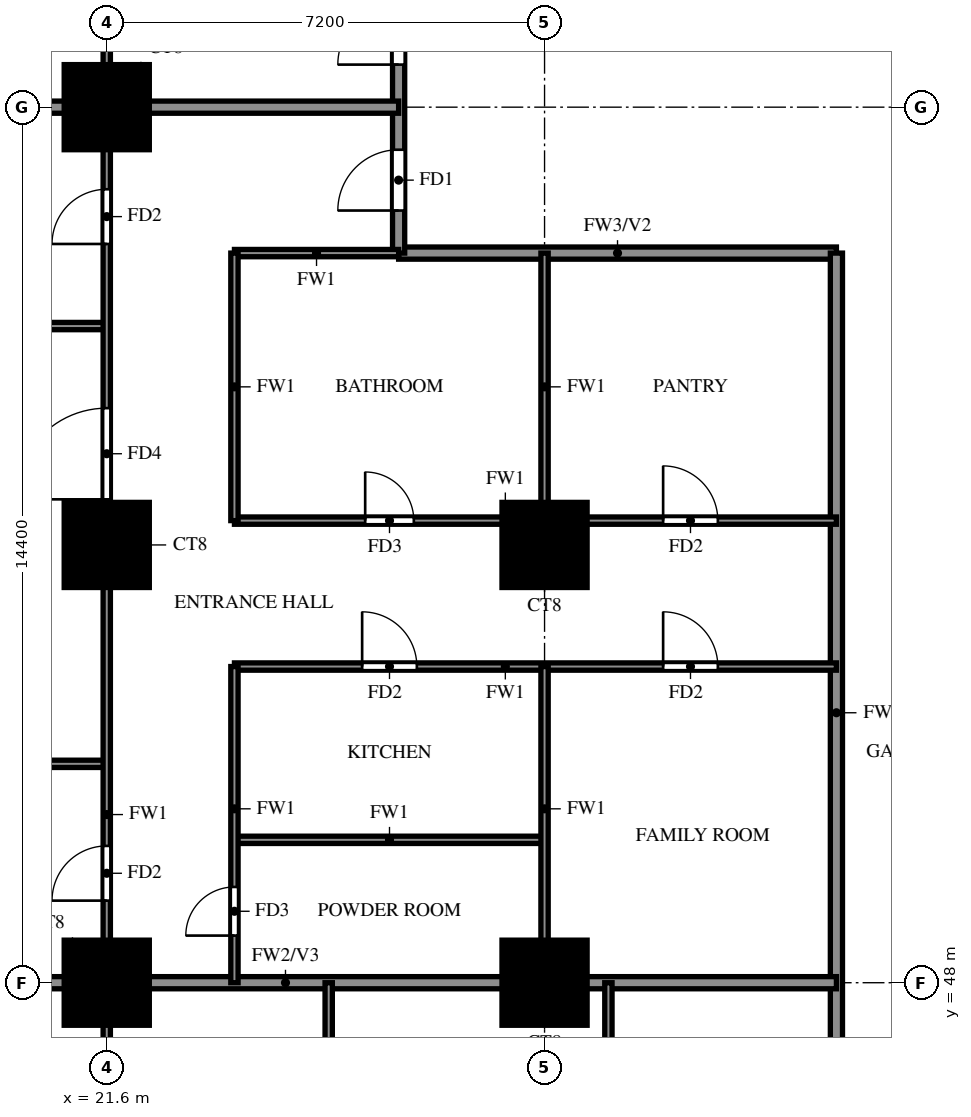
"""IFC4 building model, lengths in metres.
Left out: names, types, materials, properties, quantities, classifications, styles, units other than length and angle.
Written with IfcOpenShell. Run it as: python <this file> out.ifc"""

import sys

from ifc_helpers import new_model, si_unit, direction, frame, frame_2d, origin, origin_2d, place, context, subcontext, project, spatial, rectangle, extrude, source, transform, mapped, element, fill, save


model = new_model("IFC4")
c1 = context("Model", 3, precision=1e-05, world=origin(), true_north=direction((0.0, 1.0)))
c2 = subcontext(c1, "Body", "Model", "MODEL_VIEW")
j1 = project(units=[si_unit("LENGTHUNIT", "METRE"), si_unit("PLANEANGLEUNIT", "RADIAN")], contexts=[c1])
p1 = place(None, origin())
s1 = spatial("IfcSite", under=j1, at=p1, CompositionType="ELEMENT")
p2 = place(p1, origin())
s2 = spatial("IfcBuilding", under=s1, at=p2, CompositionType="ELEMENT")
p3 = place(p2, frame((0.0, 0.0, 30.5)))
s3 = spatial("IfcBuildingStorey", under=s2, at=p3, CompositionType="ELEMENT", Elevation=30.5)
m1 = source(origin(), c2, "Body", "SweptSolid", [
    extrude(rectangle(XDim=1.4, YDim=1.4, at=origin_2d()), origin(), (0.0, 0.0, 1.0), 3.18),
])
for number, where, z_axis, x_axis in (
    (1, (21.6, 48.0, 0.0), (0.0, 0.0, 1.0), (1.0, 0.0, 0.0)),
    (2, (28.8, 48.0, 0.0), (0.0, 0.0, 1.0), (1.0, 0.0, 0.0)),
    (3, (21.6, 55.2, 0.0), (0.0, 0.0, 1.0), (1.0, 0.0, 0.0)),
    (4, (28.8, 55.2, 0.0), (0.0, 0.0, 1.0), (1.0, 0.0, 0.0)),
    (5, (21.6, 62.4, 0.0), (0.0, 0.0, 1.0), (1.0, 0.0, 0.0)),
):
    element("IfcColumn", number, at=place(p3, frame(where, z_axis=z_axis, x_axis=x_axis)), inside=s3, PredefinedType="COLUMN", context=c2, shape_type="MappedRepresentation", body=[
        mapped(m1, transform((0.0, 0.0, 0.0))),
    ])
p4 = place(p3, frame((26.4, 60.0, 0.0), z_axis=(0.0, 0.0, 1.0), x_axis=(1.0, 0.0, 0.0)))
e6 = element("IfcWall", 6, at=p4, inside=s3, PredefinedType="SOLIDWALL", context=c2, shape_type="SweptSolid", body=[
    extrude(rectangle(XDim=7.2, YDim=0.2, at=frame_2d((3.6, 0.0))), origin(), (0.0, 0.0, 1.0), 3.18),
])
p5 = place(p3, frame((26.4, 60.0, 0.0), z_axis=(0.0, 0.0, 1.0), x_axis=(0.0, 1.0, 0.0)))
e7 = element("IfcWall", 7, at=p5, inside=s3, PredefinedType="SOLIDWALL", context=c2, shape_type="SweptSolid", body=[
    extrude(rectangle(XDim=9.6, YDim=0.2, at=frame_2d((4.8, 0.0))), origin(), (0.0, 0.0, 1.0), 3.18),
])
p6 = place(p5, frame((0.7, 0.0, 0.0)))
e8 = element("IfcOpeningElement", 8, at=p6, cuts=e7, PredefinedType="OPENING", context=c2, shape_type="SweptSolid", body=[
    extrude(rectangle(XDim=1.0, YDim=2.1, at=frame_2d((0.5, 1.05))), frame((0.0, 0.11, 0.0), z_axis=(0.0, -1.0, 0.0), x_axis=(1.0, 0.0, 0.0)), (0.0, 0.0, 1.0), 0.22),
])
p7 = place(p5, frame((3.1, 0.0, 0.0)))
e9 = element("IfcOpeningElement", 9, at=p7, cuts=e7, PredefinedType="OPENING", context=c2, shape_type="SweptSolid", body=[
    extrude(rectangle(XDim=1.0, YDim=2.1, at=frame_2d((0.5, 1.05))), frame((0.0, 0.11, 0.0), z_axis=(0.0, -1.0, 0.0), x_axis=(1.0, 0.0, 0.0)), (0.0, 0.0, 1.0), 0.22),
])
p8 = place(p3, frame((33.6, 45.6, 0.0), z_axis=(0.0, 0.0, 1.0), x_axis=(0.0, 1.0, 0.0)))
e10 = element("IfcWall", 10, at=p8, inside=s3, PredefinedType="SOLIDWALL", context=c2, shape_type="SweptSolid", body=[
    extrude(rectangle(XDim=14.4, YDim=0.2, at=frame_2d((7.2, 0.0))), origin(), (0.0, 0.0, 1.0), 3.18),
])
p9 = place(p3, frame((14.525, 48.0, 0.0), z_axis=(0.0, 0.0, 1.0), x_axis=(1.0, 0.0, 0.0)))
e11 = element("IfcWall", 11, at=p9, inside=s3, PredefinedType="SOLIDWALL", context=c2, shape_type="SweptSolid", body=[
    extrude(rectangle(XDim=19.075, YDim=0.2, at=frame_2d((9.538, 0.0))), origin(), (0.0, 0.0, 1.0), 3.18),
])
p10 = place(p3, frame((14.525, 62.4, 0.0), z_axis=(0.0, 0.0, 1.0), x_axis=(1.0, 0.0, 0.0)))
e12 = element("IfcWall", 12, at=p10, inside=s3, PredefinedType="SOLIDWALL", context=c2, shape_type="SweptSolid", body=[
    extrude(rectangle(XDim=11.875, YDim=0.2, at=frame_2d((5.938, 0.0))), origin(), (0.0, 0.0, 1.0), 3.18),
])
p11 = place(p3, frame((23.7, 50.35, 0.0), z_axis=(0.0, 0.0, 1.0), x_axis=(1.0, 0.0, 0.0)))
e13 = element("IfcWall", 13, at=p11, inside=s3, PredefinedType="PARTITIONING", context=c2, shape_type="SweptSolid", body=[
    extrude(rectangle(XDim=5.1, YDim=0.12, at=frame_2d((2.55, 0.0))), origin(), (0.0, 0.0, 1.0), 3.18),
])
p12 = place(p3, frame((14.525, 51.6, 0.0), z_axis=(0.0, 0.0, 1.0), x_axis=(1.0, 0.0, 0.0)))
e14 = element("IfcWall", 14, at=p12, inside=s3, PredefinedType="PARTITIONING", context=c2, shape_type="SweptSolid", body=[
    extrude(rectangle(XDim=7.075, YDim=0.12, at=frame_2d((3.538, 0.0))), origin(), (0.0, 0.0, 1.0), 2.28),
])
p13 = place(p3, frame((23.7, 53.2, 0.0), z_axis=(0.0, 0.0, 1.0), x_axis=(1.0, 0.0, 0.0)))
e15 = element("IfcWall", 15, at=p13, inside=s3, PredefinedType="PARTITIONING", context=c2, shape_type="SweptSolid", body=[
    extrude(rectangle(XDim=9.9, YDim=0.12, at=frame_2d((4.95, 0.0))), origin(), (0.0, 0.0, 1.0), 3.18),
])
p14 = place(p13, frame((2.1, 0.0, 0.0)))
e16 = element("IfcOpeningElement", 16, at=p14, cuts=e15, PredefinedType="OPENING", context=c2, shape_type="SweptSolid", body=[
    extrude(rectangle(XDim=0.9, YDim=2.1, at=frame_2d((0.45, 1.05))), frame((0.0, 0.07, 0.0), z_axis=(0.0, -1.0, 0.0), x_axis=(1.0, 0.0, 0.0)), (0.0, 0.0, 1.0), 0.14),
])
p15 = place(p13, frame((7.05, 0.0, 0.0)))
e17 = element("IfcOpeningElement", 17, at=p15, cuts=e15, PredefinedType="OPENING", context=c2, shape_type="SweptSolid", body=[
    extrude(rectangle(XDim=0.9, YDim=2.1, at=frame_2d((0.45, 1.05))), frame((0.0, 0.07, 0.0), z_axis=(0.0, -1.0, 0.0), x_axis=(1.0, 0.0, 0.0)), (0.0, 0.0, 1.0), 0.14),
])
p16 = place(p3, frame((23.7, 55.6, 0.0), z_axis=(0.0, 0.0, 1.0), x_axis=(1.0, 0.0, 0.0)))
e18 = element("IfcWall", 18, at=p16, inside=s3, PredefinedType="PARTITIONING", context=c2, shape_type="SweptSolid", body=[
    extrude(rectangle(XDim=9.9, YDim=0.12, at=frame_2d((4.95, 0.0))), origin(), (0.0, 0.0, 1.0), 3.18),
])
p17 = place(p16, frame((2.15, 0.0, 0.0)))
e19 = element("IfcOpeningElement", 19, at=p17, cuts=e18, PredefinedType="OPENING", context=c2, shape_type="SweptSolid", body=[
    extrude(rectangle(XDim=0.8, YDim=2.1, at=frame_2d((0.4, 1.05))), frame((0.0, 0.07, 0.0), z_axis=(0.0, -1.0, 0.0), x_axis=(1.0, 0.0, 0.0)), (0.0, 0.0, 1.0), 0.14),
])
p18 = place(p16, frame((7.05, 0.0, 0.0)))
e20 = element("IfcOpeningElement", 20, at=p18, cuts=e18, PredefinedType="OPENING", context=c2, shape_type="SweptSolid", body=[
    extrude(rectangle(XDim=0.9, YDim=2.1, at=frame_2d((0.45, 1.05))), frame((0.0, 0.07, 0.0), z_axis=(0.0, -1.0, 0.0), x_axis=(1.0, 0.0, 0.0)), (0.0, 0.0, 1.0), 0.14),
])
p19 = place(p3, frame((14.525, 58.8, 0.0), z_axis=(0.0, 0.0, 1.0), x_axis=(1.0, 0.0, 0.0)))
e21 = element("IfcWall", 21, at=p19, inside=s3, PredefinedType="PARTITIONING", context=c2, shape_type="SweptSolid", body=[
    extrude(rectangle(XDim=7.075, YDim=0.12, at=frame_2d((3.538, 0.0))), origin(), (0.0, 0.0, 1.0), 2.28),
])
p20 = place(p3, frame((23.7, 60.0, 0.0), z_axis=(0.0, 0.0, 1.0), x_axis=(1.0, 0.0, 0.0)))
e22 = element("IfcWall", 22, at=p20, inside=s3, PredefinedType="PARTITIONING", context=c2, shape_type="SweptSolid", body=[
    extrude(rectangle(XDim=2.7, YDim=0.12, at=frame_2d((1.35, 0.0))), origin(), (0.0, 0.0, 1.0), 3.18),
])
p21 = place(p3, frame((21.6, 33.725, 0.0), z_axis=(0.0, 0.0, 1.0), x_axis=(0.0, 1.0, 0.0)))
e23 = element("IfcWall", 23, at=p21, inside=s3, PredefinedType="PARTITIONING", context=c2, shape_type="SweptSolid", body=[
    extrude(rectangle(XDim=35.875, YDim=0.12, at=frame_2d((17.938, 0.0))), origin(), (0.0, 0.0, 1.0), 3.18),
])
p22 = place(p21, frame((7.775, 0.0, 0.0)))
e24 = element("IfcOpeningElement", 24, at=p22, cuts=e23, PredefinedType="OPENING", context=c2, shape_type="SweptSolid", body=[
    extrude(rectangle(XDim=0.9, YDim=2.1, at=frame_2d((0.45, 1.05))), frame((0.0, 0.07, 0.0), z_axis=(0.0, -1.0, 0.0), x_axis=(1.0, 0.0, 0.0)), (0.0, 0.0, 1.0), 0.14),
])
p23 = place(p21, frame((15.625, 0.0, 0.0)))
e25 = element("IfcOpeningElement", 25, at=p23, cuts=e23, PredefinedType="OPENING", context=c2, shape_type="SweptSolid", body=[
    extrude(rectangle(XDim=0.9, YDim=2.1, at=frame_2d((0.45, 1.05))), frame((0.0, 0.07, 0.0), z_axis=(0.0, -1.0, 0.0), x_axis=(1.0, 0.0, 0.0)), (0.0, 0.0, 1.0), 0.14),
])
p24 = place(p21, frame((22.225, 0.0, 0.0)))
e26 = element("IfcOpeningElement", 26, at=p24, cuts=e23, PredefinedType="OPENING", context=c2, shape_type="SweptSolid", body=[
    extrude(rectangle(XDim=1.5, YDim=2.1, at=frame_2d((0.75, 1.05))), frame((0.0, 0.07, 0.0), z_axis=(0.0, -1.0, 0.0), x_axis=(1.0, 0.0, 0.0)), (0.0, 0.0, 1.0), 0.14),
])
p25 = place(p21, frame((26.425, 0.0, 0.0)))
e27 = element("IfcOpeningElement", 27, at=p25, cuts=e23, PredefinedType="OPENING", context=c2, shape_type="SweptSolid", body=[
    extrude(rectangle(XDim=0.9, YDim=2.1, at=frame_2d((0.45, 1.05))), frame((0.0, 0.07, 0.0), z_axis=(0.0, -1.0, 0.0), x_axis=(1.0, 0.0, 0.0)), (0.0, 0.0, 1.0), 0.14),
])
p26 = place(p21, frame((30.025, 0.0, 0.0)))
e28 = element("IfcOpeningElement", 28, at=p26, cuts=e23, PredefinedType="OPENING", context=c2, shape_type="SweptSolid", body=[
    extrude(rectangle(XDim=0.9, YDim=2.1, at=frame_2d((0.45, 1.05))), frame((0.0, 0.07, 0.0), z_axis=(0.0, -1.0, 0.0), x_axis=(1.0, 0.0, 0.0)), (0.0, 0.0, 1.0), 0.14),
])
p27 = place(p21, frame((33.625, 0.0, 0.0)))
e29 = element("IfcOpeningElement", 29, at=p27, cuts=e23, PredefinedType="OPENING", context=c2, shape_type="SweptSolid", body=[
    extrude(rectangle(XDim=0.9, YDim=2.1, at=frame_2d((0.45, 1.05))), frame((0.0, 0.07, 0.0), z_axis=(0.0, -1.0, 0.0), x_axis=(1.0, 0.0, 0.0)), (0.0, 0.0, 1.0), 0.14),
])
p28 = place(p3, frame((23.7, 48.0, 0.0), z_axis=(0.0, 0.0, 1.0), x_axis=(0.0, 1.0, 0.0)))
e30 = element("IfcWall", 30, at=p28, inside=s3, PredefinedType="PARTITIONING", context=c2, shape_type="SweptSolid", body=[
    extrude(rectangle(XDim=5.2, YDim=0.12, at=frame_2d((2.6, 0.0))), origin(), (0.0, 0.0, 1.0), 3.18),
])
p29 = place(p28, frame((0.775, 0.0, 0.0)))
e31 = element("IfcOpeningElement", 31, at=p29, cuts=e30, PredefinedType="OPENING", context=c2, shape_type="SweptSolid", body=[
    extrude(rectangle(XDim=0.8, YDim=2.1, at=frame_2d((0.4, 1.05))), frame((0.0, 0.07, 0.0), z_axis=(0.0, -1.0, 0.0), x_axis=(1.0, 0.0, 0.0)), (0.0, 0.0, 1.0), 0.14),
])
p30 = place(p3, frame((23.7, 55.6, 0.0), z_axis=(0.0, 0.0, 1.0), x_axis=(0.0, 1.0, 0.0)))
e32 = element("IfcWall", 32, at=p30, inside=s3, PredefinedType="PARTITIONING", context=c2, shape_type="SweptSolid", body=[
    extrude(rectangle(XDim=4.4, YDim=0.12, at=frame_2d((2.2, 0.0))), origin(), (0.0, 0.0, 1.0), 3.18),
])
p31 = place(p3, frame((25.25, 42.9, 0.0), z_axis=(0.0, 0.0, 1.0), x_axis=(0.0, 1.0, 0.0)))
e33 = element("IfcWall", 33, at=p31, inside=s3, PredefinedType="PARTITIONING", context=c2, shape_type="SweptSolid", body=[
    extrude(rectangle(XDim=5.1, YDim=0.12, at=frame_2d((2.55, 0.0))), origin(), (0.0, 0.0, 1.0), 3.18),
])
p32 = place(p3, frame((28.8, 48.0, 0.0), z_axis=(0.0, 0.0, 1.0), x_axis=(0.0, 1.0, 0.0)))
e34 = element("IfcWall", 34, at=p32, inside=s3, PredefinedType="PARTITIONING", context=c2, shape_type="SweptSolid", body=[
    extrude(rectangle(XDim=5.2, YDim=0.12, at=frame_2d((2.6, 0.0))), origin(), (0.0, 0.0, 1.0), 3.18),
])
p33 = place(p3, frame((28.8, 55.6, 0.0), z_axis=(0.0, 0.0, 1.0), x_axis=(0.0, 1.0, 0.0)))
e35 = element("IfcWall", 35, at=p33, inside=s3, PredefinedType="PARTITIONING", context=c2, shape_type="SweptSolid", body=[
    extrude(rectangle(XDim=4.4, YDim=0.12, at=frame_2d((2.2, 0.0))), origin(), (0.0, 0.0, 1.0), 3.18),
])
p34 = place(p3, frame((29.85, 42.9, 0.0), z_axis=(0.0, 0.0, 1.0), x_axis=(0.0, 1.0, 0.0)))
e36 = element("IfcWall", 36, at=p34, inside=s3, PredefinedType="PARTITIONING", context=c2, shape_type="SweptSolid", body=[
    extrude(rectangle(XDim=5.1, YDim=0.12, at=frame_2d((2.55, 0.0))), origin(), (0.0, 0.0, 1.0), 3.18),
])
p35 = place(p6, origin())
e37 = element("IfcDoor", 37, at=p35, inside=s3, OperationType="SINGLE_SWING_LEFT", PredefinedType="DOOR", context=c2, shape_type="SweptSolid", body=[
    extrude(rectangle(XDim=1.0, YDim=2.1, at=frame_2d((0.5, 1.05))), frame((0.0, 0.025, 0.0), z_axis=(0.0, -1.0, 0.0), x_axis=(1.0, 0.0, 0.0)), (0.0, 0.0, 1.0), 0.05),
])
fill(e8, e37)
p36 = place(p23, origin())
e38 = element("IfcDoor", 38, at=p36, inside=s3, OperationType="SINGLE_SWING_RIGHT", PredefinedType="DOOR", context=c2, shape_type="SweptSolid", body=[
    extrude(rectangle(XDim=0.9, YDim=2.1, at=frame_2d((0.45, 1.05))), frame((0.0, 0.025, 0.0), z_axis=(0.0, -1.0, 0.0), x_axis=(1.0, 0.0, 0.0)), (0.0, 0.0, 1.0), 0.05),
])
fill(e25, e38)
p37 = place(p24, origin())
e39 = element("IfcDoor", 39, at=p37, inside=s3, OperationType="SINGLE_SWING_RIGHT", PredefinedType="DOOR", context=c2, shape_type="SweptSolid", body=[
    extrude(rectangle(XDim=1.5, YDim=2.1, at=frame_2d((0.75, 1.05))), frame((0.0, 0.025, 0.0), z_axis=(0.0, -1.0, 0.0), x_axis=(1.0, 0.0, 0.0)), (0.0, 0.0, 1.0), 0.05),
])
fill(e26, e39)
p38 = place(p25, origin())
e40 = element("IfcDoor", 40, at=p38, inside=s3, OperationType="SINGLE_SWING_LEFT", PredefinedType="DOOR", context=c2, shape_type="SweptSolid", body=[
    extrude(rectangle(XDim=0.9, YDim=2.1, at=frame_2d((0.45, 1.05))), frame((0.0, 0.025, 0.0), z_axis=(0.0, -1.0, 0.0), x_axis=(1.0, 0.0, 0.0)), (0.0, 0.0, 1.0), 0.05),
])
fill(e27, e40)
p39 = place(p29, origin())
e41 = element("IfcDoor", 41, at=p39, inside=s3, OperationType="SINGLE_SWING_RIGHT", PredefinedType="DOOR", context=c2, shape_type="SweptSolid", body=[
    extrude(rectangle(XDim=0.8, YDim=2.1, at=frame_2d((0.4, 1.05))), frame((0.0, 0.025, 0.0), z_axis=(0.0, -1.0, 0.0), x_axis=(1.0, 0.0, 0.0)), (0.0, 0.0, 1.0), 0.05),
])
fill(e31, e41)
p40 = place(p14, origin())
e42 = element("IfcDoor", 42, at=p40, inside=s3, OperationType="SINGLE_SWING_LEFT", PredefinedType="DOOR", context=c2, shape_type="SweptSolid", body=[
    extrude(rectangle(XDim=0.9, YDim=2.1, at=frame_2d((0.45, 1.05))), frame((0.0, 0.025, 0.0), z_axis=(0.0, -1.0, 0.0), x_axis=(1.0, 0.0, 0.0)), (0.0, 0.0, 1.0), 0.05),
])
fill(e16, e42)
p41 = place(p17, origin())
e43 = element("IfcDoor", 43, at=p41, inside=s3, OperationType="SINGLE_SWING_LEFT", PredefinedType="DOOR", context=c2, shape_type="SweptSolid", body=[
    extrude(rectangle(XDim=0.8, YDim=2.1, at=frame_2d((0.4, 1.05))), frame((0.0, 0.025, 0.0), z_axis=(0.0, -1.0, 0.0), x_axis=(1.0, 0.0, 0.0)), (0.0, 0.0, 1.0), 0.05),
])
fill(e19, e43)
p42 = place(p15, origin())
e44 = element("IfcDoor", 44, at=p42, inside=s3, OperationType="SINGLE_SWING_RIGHT", PredefinedType="DOOR", context=c2, shape_type="SweptSolid", body=[
    extrude(rectangle(XDim=0.9, YDim=2.1, at=frame_2d((0.45, 1.05))), frame((0.0, 0.025, 0.0), z_axis=(0.0, -1.0, 0.0), x_axis=(1.0, 0.0, 0.0)), (0.0, 0.0, 1.0), 0.05),
])
fill(e17, e44)
p43 = place(p18, origin())
e45 = element("IfcDoor", 45, at=p43, inside=s3, OperationType="SINGLE_SWING_LEFT", PredefinedType="DOOR", context=c2, shape_type="SweptSolid", body=[
    extrude(rectangle(XDim=0.9, YDim=2.1, at=frame_2d((0.45, 1.05))), frame((0.0, 0.025, 0.0), z_axis=(0.0, -1.0, 0.0), x_axis=(1.0, 0.0, 0.0)), (0.0, 0.0, 1.0), 0.05),
])
fill(e20, e45)
p44 = place(p7, origin())
e46 = element("IfcDoor", 46, at=p44, inside=s3, OperationType="SINGLE_SWING_RIGHT", PredefinedType="DOOR", context=c2, shape_type="SweptSolid", body=[
    extrude(rectangle(XDim=1.0, YDim=2.1, at=frame_2d((0.5, 1.05))), frame((0.0, 0.025, 0.0), z_axis=(0.0, -1.0, 0.0), x_axis=(1.0, 0.0, 0.0)), (0.0, 0.0, 1.0), 0.05),
])
fill(e9, e46)
save(model, sys.argv[1])
